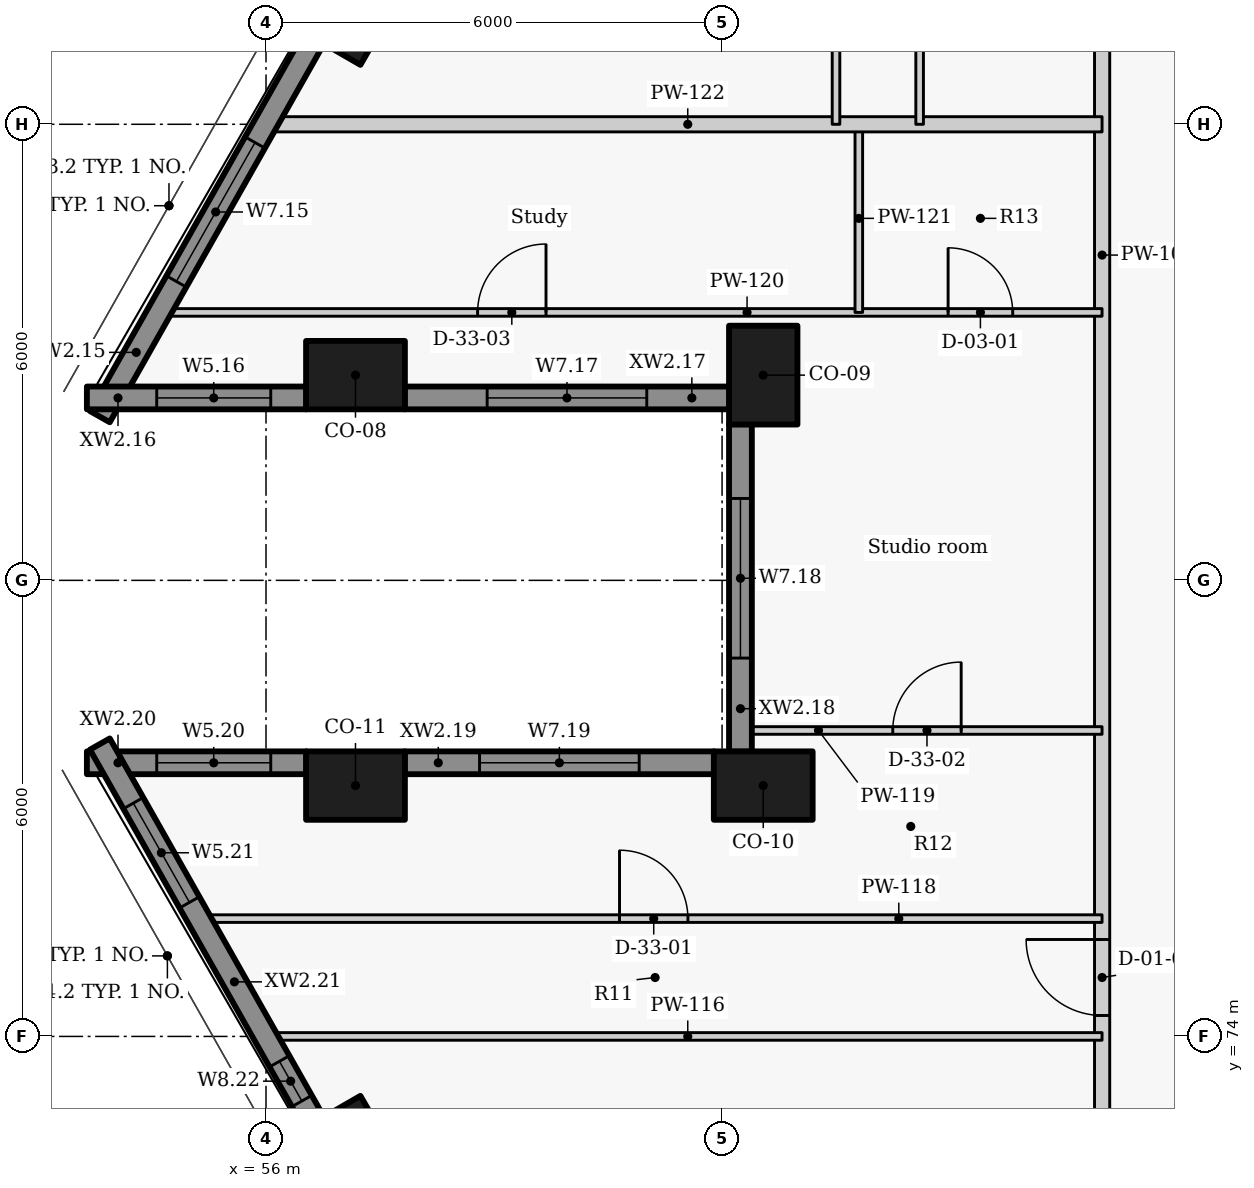
"""IFC4 building model, lengths in metres.
Left out: names, types, materials, properties, quantities, classifications, styles, units other than length and angle.
Written with IfcOpenShell. Run it as: python <this file> out.ifc"""

import sys

from ifc_helpers import new_model, si_unit, direction, frame, frame_2d, origin, origin_2d, place, context, subcontext, project, spatial, rectangle, extrude, element, fill, save


model = new_model("IFC4")
c1 = context("Model", 3, precision=1e-05, world=origin(), true_north=direction((0.0, 1.0)))
c2 = subcontext(c1, "Body", "Model", "MODEL_VIEW")
j1 = project(units=[si_unit("LENGTHUNIT", "METRE"), si_unit("PLANEANGLEUNIT", "RADIAN")], contexts=[c1])
p1 = place(None, origin())
s1 = spatial("IfcSite", under=j1, at=p1, CompositionType="ELEMENT")
p2 = place(p1, origin())
s2 = spatial("IfcBuilding", under=s1, at=p2, CompositionType="ELEMENT")
p3 = place(p2, frame((0.0, 0.0, 130.5)))
s3 = spatial("IfcBuildingStorey", under=s2, at=p3, CompositionType="ELEMENT", Elevation=130.5)
for number, where, z_axis, x_axis in (
    (1, (57.177, 87.57, 0.0), (0.0, 0.0, 1.0), (-0.5, -0.866, 0.0)),
    (2, (57.177, 82.7, 0.0), (0.0, 0.0, 1.0), (1.0, 0.0, 0.0)),
    (3, (62.542, 82.7, 0.0), (0.0, 0.0, 1.0), (0.0, -1.0, 0.0)),
    (4, (62.542, 77.3, 0.0), (0.0, 0.0, 1.0), (-1.0, 0.0, 0.0)),
    (5, (57.177, 77.3, 0.0), (0.0, 0.0, 1.0), (-1.0, 0.0, 0.0)),
    (6, (57.177, 72.43, 0.0), (0.0, 0.0, 1.0), (0.5, -0.866, 0.0)),
):
    element("IfcColumn", number, at=place(p3, frame(where, z_axis=z_axis, x_axis=x_axis)), inside=s3, PredefinedType="COLUMN", context=c2, shape_type="SweptSolid", body=[
        extrude(rectangle(XDim=1.3, YDim=0.9, at=origin_2d()), origin(), (0.0, 0.0, 1.0), 3.3),
    ])
p4 = place(p3, frame((56.634, 87.137, 0.0), z_axis=(0.0, 0.0, 1.0), x_axis=(-0.492498306264, -0.87031340236, 0.0)))
e7 = element("IfcWall", 7, at=p4, inside=s3, PredefinedType="SOLIDWALL", context=c2, shape_type="SweptSolid", body=[
    extrude(rectangle(XDim=5.727, YDim=0.3, at=frame_2d((2.863, 0.0))), origin(), (0.0, 0.0, 1.0), 2.425),
])
p5 = place(p4, frame((1.582, 0.0, 0.9)))
e8 = element("IfcOpeningElement", 8, at=p5, cuts=e7, PredefinedType="OPENING", context=c2, shape_type="SweptSolid", body=[
    extrude(rectangle(XDim=2.1, YDim=1.1, at=frame_2d((1.05, 0.55))), frame((0.0, 0.16, 0.0), z_axis=(0.0, -1.0, 0.0), x_axis=(1.0, 0.0, 0.0)), (0.0, 0.0, 1.0), 0.32),
])
p6 = place(p3, frame((53.643, 82.4, 0.0), z_axis=(0.0, 0.0, 1.0), x_axis=(1.0, 0.0, 0.0)))
e9 = element("IfcWall", 9, at=p6, inside=s3, PredefinedType="SOLIDWALL", context=c2, shape_type="SweptSolid", body=[
    extrude(rectangle(XDim=2.888, YDim=0.3, at=frame_2d((1.444, 0.0))), origin(), (0.0, 0.0, 1.0), 2.425),
])
p7 = place(p6, frame((0.919, 0.0, 0.9)))
e10 = element("IfcOpeningElement", 10, at=p7, cuts=e9, PredefinedType="OPENING", context=c2, shape_type="SweptSolid", body=[
    extrude(rectangle(XDim=1.5, YDim=1.1, at=frame_2d((0.75, 0.55))), frame((0.0, 0.16, 0.0), z_axis=(0.0, -1.0, 0.0), x_axis=(1.0, 0.0, 0.0)), (0.0, 0.0, 1.0), 0.32),
])
p8 = place(p3, frame((57.823, 82.4, 0.0), z_axis=(0.0, 0.0, 1.0), x_axis=(1.0, 0.0, 0.0)))
e11 = element("IfcWall", 11, at=p8, inside=s3, PredefinedType="SOLIDWALL", context=c2, shape_type="SweptSolid", body=[
    extrude(rectangle(XDim=4.273, YDim=0.3, at=frame_2d((2.136, 0.0))), origin(), (0.0, 0.0, 1.0), 2.425),
])
p9 = place(p8, frame((1.086, 0.0, 0.9)))
e12 = element("IfcOpeningElement", 12, at=p9, cuts=e11, PredefinedType="OPENING", context=c2, shape_type="SweptSolid", body=[
    extrude(rectangle(XDim=2.1, YDim=1.1, at=frame_2d((1.05, 0.55))), frame((0.0, 0.16, 0.0), z_axis=(0.0, -1.0, 0.0), x_axis=(1.0, 0.0, 0.0)), (0.0, 0.0, 1.0), 0.32),
])
p10 = place(p3, frame((62.242, 82.054, 0.0), z_axis=(0.0, 0.0, 1.0), x_axis=(0.0, -1.0, 0.0)))
e13 = element("IfcWall", 13, at=p10, inside=s3, PredefinedType="SOLIDWALL", context=c2, shape_type="SweptSolid", body=[
    extrude(rectangle(XDim=4.308, YDim=0.3, at=frame_2d((2.154, 0.0))), origin(), (0.0, 0.0, 1.0), 2.425),
])
p11 = place(p10, frame((0.977, 0.0, 0.9)))
e14 = element("IfcOpeningElement", 14, at=p11, cuts=e13, PredefinedType="OPENING", context=c2, shape_type="SweptSolid", body=[
    extrude(rectangle(XDim=2.1, YDim=1.1, at=frame_2d((1.05, 0.55))), frame((0.0, 0.16, 0.0), z_axis=(0.0, -1.0, 0.0), x_axis=(1.0, 0.0, 0.0)), (0.0, 0.0, 1.0), 0.32),
])
p12 = place(p3, frame((61.896, 77.6, 0.0), z_axis=(0.0, 0.0, 1.0), x_axis=(-1.0, 0.0, 0.0)))
e15 = element("IfcWall", 15, at=p12, inside=s3, PredefinedType="SOLIDWALL", context=c2, shape_type="SweptSolid", body=[
    extrude(rectangle(XDim=4.073, YDim=0.3, at=frame_2d((2.036, 0.0))), origin(), (0.0, 0.0, 1.0), 2.425),
])
p13 = place(p12, frame((0.986, 0.0, 0.9)))
e16 = element("IfcOpeningElement", 16, at=p13, cuts=e15, PredefinedType="OPENING", context=c2, shape_type="SweptSolid", body=[
    extrude(rectangle(XDim=2.1, YDim=1.1, at=frame_2d((1.05, 0.55))), frame((0.0, 0.16, 0.0), z_axis=(0.0, -1.0, 0.0), x_axis=(1.0, 0.0, 0.0)), (0.0, 0.0, 1.0), 0.32),
])
p14 = place(p3, frame((56.531, 77.6, 0.0), z_axis=(0.0, 0.0, 1.0), x_axis=(-1.0, 0.0, 0.0)))
e17 = element("IfcWall", 17, at=p14, inside=s3, PredefinedType="SOLIDWALL", context=c2, shape_type="SweptSolid", body=[
    extrude(rectangle(XDim=2.888, YDim=0.3, at=frame_2d((1.444, 0.0))), origin(), (0.0, 0.0, 1.0), 2.425),
])
p15 = place(p14, frame((0.469, 0.0, 0.9)))
e18 = element("IfcOpeningElement", 18, at=p15, cuts=e17, PredefinedType="OPENING", context=c2, shape_type="SweptSolid", body=[
    extrude(rectangle(XDim=1.5, YDim=1.1, at=frame_2d((0.75, 0.55))), frame((0.0, 0.16, 0.0), z_axis=(0.0, -1.0, 0.0), x_axis=(1.0, 0.0, 0.0)), (0.0, 0.0, 1.0), 0.32),
])
p16 = place(p3, frame((53.814, 77.847, 0.0), z_axis=(0.0, 0.0, 1.0), x_axis=(0.492498306264, -0.87031340236, 0.0)))
e19 = element("IfcWall", 19, at=p16, inside=s3, PredefinedType="SOLIDWALL", context=c2, shape_type="SweptSolid", body=[
    extrude(rectangle(XDim=5.727, YDim=0.3, at=frame_2d((2.863, 0.0))), origin(), (0.0, 0.0, 1.0), 2.425),
])
p17 = place(p16, frame((0.894, 0.0, 0.9)))
e20 = element("IfcOpeningElement", 20, at=p17, cuts=e19, PredefinedType="OPENING", context=c2, shape_type="SweptSolid", body=[
    extrude(rectangle(XDim=1.5, YDim=1.1, at=frame_2d((0.75, 0.55))), frame((0.0, 0.16, 0.0), z_axis=(0.0, -1.0, 0.0), x_axis=(1.0, 0.0, 0.0)), (0.0, 0.0, 1.0), 0.32),
])
p18 = place(p16, frame((4.796, 0.0, 0.9)))
e21 = element("IfcOpeningElement", 21, at=p18, cuts=e19, PredefinedType="OPENING", context=c2, shape_type="SweptSolid", body=[
    extrude(rectangle(XDim=0.6, YDim=1.1, at=frame_2d((0.3, 0.55))), frame((0.0, 0.16, 0.0), z_axis=(0.0, -1.0, 0.0), x_axis=(1.0, 0.0, 0.0)), (0.0, 0.0, 1.0), 0.32),
])
p19 = place(p3, frame((67.0, 56.833, 0.0), z_axis=(0.0, 0.0, 1.0), x_axis=(0.0, 1.0, 0.0)))
e22 = element("IfcWall", 22, at=p19, inside=s3, PredefinedType="PARTITIONING", context=c2, shape_type="SweptSolid", body=[
    extrude(rectangle(XDim=45.661, YDim=0.2, at=frame_2d((22.831, 0.0))), origin(), (0.0, 0.0, 1.0), 2.405),
])
p20 = place(p19, frame((8.084, 0.0, 0.0)))
e23 = element("IfcOpeningElement", 23, at=p20, cuts=e22, PredefinedType="OPENING", context=c2, shape_type="SweptSolid", body=[
    extrude(rectangle(XDim=1.0, YDim=2.1, at=frame_2d((0.5, 1.05))), frame((0.0, 0.11, 0.0), z_axis=(0.0, -1.0, 0.0), x_axis=(1.0, 0.0, 0.0)), (0.0, 0.0, 1.0), 0.22),
])
p21 = place(p19, frame((17.442, 0.0, 0.0)))
e24 = element("IfcOpeningElement", 24, at=p21, cuts=e22, PredefinedType="OPENING", context=c2, shape_type="SweptSolid", body=[
    extrude(rectangle(XDim=1.0, YDim=2.1, at=frame_2d((0.5, 1.05))), frame((0.0, 0.11, 0.0), z_axis=(0.0, -1.0, 0.0), x_axis=(1.0, 0.0, 0.0)), (0.0, 0.0, 1.0), 0.22),
])
p22 = place(p19, frame((36.45, 0.0, 0.0)))
e25 = element("IfcOpeningElement", 25, at=p22, cuts=e22, PredefinedType="OPENING", context=c2, shape_type="SweptSolid", body=[
    extrude(rectangle(XDim=1.0, YDim=2.1, at=frame_2d((0.5, 1.05))), frame((0.0, 0.11, 0.0), z_axis=(0.0, -1.0, 0.0), x_axis=(1.0, 0.0, 0.0)), (0.0, 0.0, 1.0), 0.22),
])
p23 = place(p19, frame((41.203, 0.0, 0.0)))
e26 = element("IfcOpeningElement", 26, at=p23, cuts=e22, PredefinedType="OPENING", context=c2, shape_type="SweptSolid", body=[
    extrude(rectangle(XDim=1.0, YDim=2.1, at=frame_2d((0.5, 1.05))), frame((0.0, 0.11, 0.0), z_axis=(0.0, -1.0, 0.0), x_axis=(1.0, 0.0, 0.0)), (0.0, 0.0, 1.0), 0.22),
])
p24 = place(p3, frame((56.098, 74.0, 0.0), z_axis=(0.0, 0.0, 1.0), x_axis=(1.0, 0.0, 0.0)))
e27 = element("IfcWall", 27, at=p24, inside=s3, PredefinedType="PARTITIONING", context=c2, shape_type="SweptSolid", body=[
    extrude(rectangle(XDim=10.901, YDim=0.1, at=frame_2d((5.451, 0.0))), origin(), (0.0, 0.0, 1.0), 2.405),
])
p25 = place(p3, frame((55.203, 75.55, 0.0), z_axis=(0.0, 0.0, 1.0), x_axis=(1.0, 0.0, 0.0)))
e28 = element("IfcWall", 28, at=p25, inside=s3, PredefinedType="PARTITIONING", context=c2, shape_type="SweptSolid", body=[
    extrude(rectangle(XDim=11.796, YDim=0.1, at=frame_2d((5.898, 0.0))), origin(), (0.0, 0.0, 1.0), 2.405),
])
p26 = place(p25, frame((5.448, 0.0, 0.0)))
e29 = element("IfcOpeningElement", 29, at=p26, cuts=e28, PredefinedType="OPENING", context=c2, shape_type="SweptSolid", body=[
    extrude(rectangle(XDim=0.9, YDim=2.1, at=frame_2d((0.45, 1.05))), frame((0.0, 0.06, 0.0), z_axis=(0.0, -1.0, 0.0), x_axis=(1.0, 0.0, 0.0)), (0.0, 0.0, 1.0), 0.12),
])
p27 = place(p3, frame((62.392, 78.025, 0.0), z_axis=(0.0, 0.0, 1.0), x_axis=(1.0, 0.0, 0.0)))
e30 = element("IfcWall", 30, at=p27, inside=s3, PredefinedType="PARTITIONING", context=c2, shape_type="SweptSolid", body=[
    extrude(rectangle(XDim=4.607, YDim=0.1, at=frame_2d((2.304, 0.0))), origin(), (0.0, 0.0, 1.0), 2.405),
])
p28 = place(p27, frame((1.854, 0.0, 0.0)))
e31 = element("IfcOpeningElement", 31, at=p28, cuts=e30, PredefinedType="OPENING", context=c2, shape_type="SweptSolid", body=[
    extrude(rectangle(XDim=0.9, YDim=2.1, at=frame_2d((0.45, 1.05))), frame((0.0, 0.06, 0.0), z_axis=(0.0, -1.0, 0.0), x_axis=(1.0, 0.0, 0.0)), (0.0, 0.0, 1.0), 0.12),
])
p29 = place(p3, frame((54.669, 83.525, 0.0), z_axis=(0.0, 0.0, 1.0), x_axis=(1.0, 0.0, 0.0)))
e32 = element("IfcWall", 32, at=p29, inside=s3, PredefinedType="PARTITIONING", context=c2, shape_type="SweptSolid", body=[
    extrude(rectangle(XDim=12.33, YDim=0.1, at=frame_2d((6.165, 0.0))), origin(), (0.0, 0.0, 1.0), 2.405),
])
p30 = place(p29, frame((10.305, 0.0, 0.0)))
e33 = element("IfcOpeningElement", 33, at=p30, cuts=e32, PredefinedType="OPENING", context=c2, shape_type="SweptSolid", body=[
    extrude(rectangle(XDim=0.85, YDim=2.1, at=frame_2d((0.425, 1.05))), frame((0.0, 0.06, 0.0), z_axis=(0.0, -1.0, 0.0), x_axis=(1.0, 0.0, 0.0)), (0.0, 0.0, 1.0), 0.12),
])
p31 = place(p29, frame((4.115, 0.0, 0.0)))
e34 = element("IfcOpeningElement", 34, at=p31, cuts=e32, PredefinedType="OPENING", context=c2, shape_type="SweptSolid", body=[
    extrude(rectangle(XDim=0.9, YDim=2.1, at=frame_2d((0.45, 1.05))), frame((0.0, 0.06, 0.0), z_axis=(0.0, -1.0, 0.0), x_axis=(1.0, 0.0, 0.0)), (0.0, 0.0, 1.0), 0.12),
])
p32 = place(p3, frame((63.799, 83.525, 0.0), z_axis=(0.0, 0.0, 1.0), x_axis=(0.0, 1.0, 0.0)))
e35 = element("IfcWall", 35, at=p32, inside=s3, PredefinedType="PARTITIONING", context=c2, shape_type="SweptSolid", body=[
    extrude(rectangle(XDim=2.475, YDim=0.1, at=frame_2d((1.238, 0.0))), origin(), (0.0, 0.0, 1.0), 3.025),
])
p33 = place(p3, frame((56.098, 86.0, 0.0), z_axis=(0.0, 0.0, 1.0), x_axis=(1.0, 0.0, 0.0)))
e36 = element("IfcWall", 36, at=p33, inside=s3, PredefinedType="PARTITIONING", context=c2, shape_type="SweptSolid", body=[
    extrude(rectangle(XDim=10.901, YDim=0.2, at=frame_2d((5.451, 0.0))), origin(), (0.0, 0.0, 1.0), 2.405),
])
p34 = place(p3, frame((64.599, 92.983, 0.0), z_axis=(0.0, 0.0, 1.0), x_axis=(0.0, -1.0, 0.0)))
e37 = element("IfcWall", 37, at=p34, inside=s3, PredefinedType="PARTITIONING", context=c2, shape_type="SweptSolid", body=[
    extrude(rectangle(XDim=6.983, YDim=0.1, at=frame_2d((3.492, 0.0))), origin(), (0.0, 0.0, 1.0), 3.025),
])
p35 = place(p34, frame((4.629, 0.0, 0.0)))
e38 = element("IfcOpeningElement", 38, at=p35, cuts=e37, PredefinedType="OPENING", context=c2, shape_type="SweptSolid", body=[
    extrude(rectangle(XDim=0.9, YDim=2.1, at=frame_2d((0.45, 1.05))), frame((0.0, 0.06, 0.0), z_axis=(0.0, -1.0, 0.0), x_axis=(1.0, 0.0, 0.0)), (0.0, 0.0, 1.0), 0.12),
])
p36 = place(p34, frame((1.162, 0.0, 0.0)))
e39 = element("IfcOpeningElement", 39, at=p36, cuts=e37, PredefinedType="OPENING", context=c2, shape_type="SweptSolid", body=[
    extrude(rectangle(XDim=0.85, YDim=2.1, at=frame_2d((0.425, 1.05))), frame((0.0, 0.06, 0.0), z_axis=(0.0, -1.0, 0.0), x_axis=(1.0, 0.0, 0.0)), (0.0, 0.0, 1.0), 0.12),
])
p37 = place(p3, frame((63.499, 86.0, 0.0), z_axis=(0.0, 0.0, 1.0), x_axis=(0.0, 1.0, 0.0)))
e40 = element("IfcWall", 40, at=p37, inside=s3, PredefinedType="PARTITIONING", context=c2, shape_type="SweptSolid", body=[
    extrude(rectangle(XDim=8.583, YDim=0.1, at=frame_2d((4.292, 0.0))), origin(), (0.0, 0.0, 1.0), 3.025),
])
p38 = place(p37, frame((3.842, 0.0, 0.0)))
e41 = element("IfcOpeningElement", 41, at=p38, cuts=e40, PredefinedType="OPENING", context=c2, shape_type="SweptSolid", body=[
    extrude(rectangle(XDim=0.9, YDim=2.1, at=frame_2d((0.45, 1.05))), frame((0.0, 0.06, 0.0), z_axis=(0.0, -1.0, 0.0), x_axis=(1.0, 0.0, 0.0)), (0.0, 0.0, 1.0), 0.12),
])
p39 = place(p5, origin())
e42 = element("IfcWindow", 42, at=p39, inside=s3, PartitioningType="SINGLE_PANEL", PredefinedType="WINDOW", context=c2, shape_type="SweptSolid", body=[
    extrude(rectangle(XDim=2.1, YDim=1.1, at=frame_2d((1.05, 0.55))), frame((0.0, 0.03, 0.0), z_axis=(0.0, -1.0, 0.0), x_axis=(1.0, 0.0, 0.0)), (0.0, 0.0, 1.0), 0.06),
])
fill(e8, e42)
p40 = place(p7, origin())
e43 = element("IfcWindow", 43, at=p40, inside=s3, PartitioningType="SINGLE_PANEL", PredefinedType="WINDOW", context=c2, shape_type="SweptSolid", body=[
    extrude(rectangle(XDim=1.5, YDim=1.1, at=frame_2d((0.75, 0.55))), frame((0.0, 0.03, 0.0), z_axis=(0.0, -1.0, 0.0), x_axis=(1.0, 0.0, 0.0)), (0.0, 0.0, 1.0), 0.06),
])
fill(e10, e43)
p41 = place(p9, origin())
e44 = element("IfcWindow", 44, at=p41, inside=s3, PartitioningType="SINGLE_PANEL", PredefinedType="WINDOW", context=c2, shape_type="SweptSolid", body=[
    extrude(rectangle(XDim=2.1, YDim=1.1, at=frame_2d((1.05, 0.55))), frame((0.0, 0.03, 0.0), z_axis=(0.0, -1.0, 0.0), x_axis=(1.0, 0.0, 0.0)), (0.0, 0.0, 1.0), 0.06),
])
fill(e12, e44)
p42 = place(p11, origin())
e45 = element("IfcWindow", 45, at=p42, inside=s3, PartitioningType="SINGLE_PANEL", PredefinedType="WINDOW", context=c2, shape_type="SweptSolid", body=[
    extrude(rectangle(XDim=2.1, YDim=1.1, at=frame_2d((1.05, 0.55))), frame((0.0, 0.03, 0.0), z_axis=(0.0, -1.0, 0.0), x_axis=(1.0, 0.0, 0.0)), (0.0, 0.0, 1.0), 0.06),
])
fill(e14, e45)
p43 = place(p13, origin())
e46 = element("IfcWindow", 46, at=p43, inside=s3, PartitioningType="SINGLE_PANEL", PredefinedType="WINDOW", context=c2, shape_type="SweptSolid", body=[
    extrude(rectangle(XDim=2.1, YDim=1.1, at=frame_2d((1.05, 0.55))), frame((0.0, 0.03, 0.0), z_axis=(0.0, -1.0, 0.0), x_axis=(1.0, 0.0, 0.0)), (0.0, 0.0, 1.0), 0.06),
])
fill(e16, e46)
p44 = place(p15, origin())
e47 = element("IfcWindow", 47, at=p44, inside=s3, PartitioningType="SINGLE_PANEL", PredefinedType="WINDOW", context=c2, shape_type="SweptSolid", body=[
    extrude(rectangle(XDim=1.5, YDim=1.1, at=frame_2d((0.75, 0.55))), frame((0.0, 0.03, 0.0), z_axis=(0.0, -1.0, 0.0), x_axis=(1.0, 0.0, 0.0)), (0.0, 0.0, 1.0), 0.06),
])
fill(e18, e47)
p45 = place(p17, origin())
e48 = element("IfcWindow", 48, at=p45, inside=s3, PartitioningType="SINGLE_PANEL", PredefinedType="WINDOW", context=c2, shape_type="SweptSolid", body=[
    extrude(rectangle(XDim=1.5, YDim=1.1, at=frame_2d((0.75, 0.55))), frame((0.0, 0.03, 0.0), z_axis=(0.0, -1.0, 0.0), x_axis=(1.0, 0.0, 0.0)), (0.0, 0.0, 1.0), 0.06),
])
fill(e20, e48)
p46 = place(p18, origin())
e49 = element("IfcWindow", 49, at=p46, inside=s3, PartitioningType="SINGLE_PANEL", PredefinedType="WINDOW", context=c2, shape_type="SweptSolid", body=[
    extrude(rectangle(XDim=0.6, YDim=1.1, at=frame_2d((0.3, 0.55))), frame((0.0, 0.03, 0.0), z_axis=(0.0, -1.0, 0.0), x_axis=(1.0, 0.0, 0.0)), (0.0, 0.0, 1.0), 0.06),
])
fill(e21, e49)
p47 = place(p21, origin())
e50 = element("IfcDoor", 50, at=p47, inside=s3, OperationType="SINGLE_SWING_RIGHT", PredefinedType="DOOR", context=c2, shape_type="SweptSolid", body=[
    extrude(rectangle(XDim=1.0, YDim=2.1, at=frame_2d((0.5, 1.05))), frame((0.0, 0.025, 0.0), z_axis=(0.0, -1.0, 0.0), x_axis=(1.0, 0.0, 0.0)), (0.0, 0.0, 1.0), 0.05),
])
fill(e24, e50)
p48 = place(p26, origin())
e51 = element("IfcDoor", 51, at=p48, inside=s3, OperationType="SINGLE_SWING_LEFT", PredefinedType="DOOR", context=c2, shape_type="SweptSolid", body=[
    extrude(rectangle(XDim=0.9, YDim=2.1, at=frame_2d((0.45, 1.05))), frame((0.0, 0.025, 0.0), z_axis=(0.0, -1.0, 0.0), x_axis=(1.0, 0.0, 0.0)), (0.0, 0.0, 1.0), 0.05),
])
fill(e29, e51)
p49 = place(p28, origin())
e52 = element("IfcDoor", 52, at=p49, inside=s3, OperationType="SINGLE_SWING_RIGHT", PredefinedType="DOOR", context=c2, shape_type="SweptSolid", body=[
    extrude(rectangle(XDim=0.9, YDim=2.1, at=frame_2d((0.45, 1.05))), frame((0.0, 0.025, 0.0), z_axis=(0.0, -1.0, 0.0), x_axis=(1.0, 0.0, 0.0)), (0.0, 0.0, 1.0), 0.05),
])
fill(e31, e52)
p50 = place(p30, origin())
e53 = element("IfcDoor", 53, at=p50, inside=s3, OperationType="SINGLE_SWING_LEFT", PredefinedType="DOOR", context=c2, shape_type="SweptSolid", body=[
    extrude(rectangle(XDim=0.85, YDim=2.1, at=frame_2d((0.425, 1.05))), frame((0.0, 0.025, 0.0), z_axis=(0.0, -1.0, 0.0), x_axis=(1.0, 0.0, 0.0)), (0.0, 0.0, 1.0), 0.05),
])
fill(e33, e53)
p51 = place(p31, origin())
e54 = element("IfcDoor", 54, at=p51, inside=s3, OperationType="SINGLE_SWING_RIGHT", PredefinedType="DOOR", context=c2, shape_type="SweptSolid", body=[
    extrude(rectangle(XDim=0.9, YDim=2.1, at=frame_2d((0.45, 1.05))), frame((0.0, 0.025, 0.0), z_axis=(0.0, -1.0, 0.0), x_axis=(1.0, 0.0, 0.0)), (0.0, 0.0, 1.0), 0.05),
])
fill(e34, e54)
save(model, sys.argv[1])
